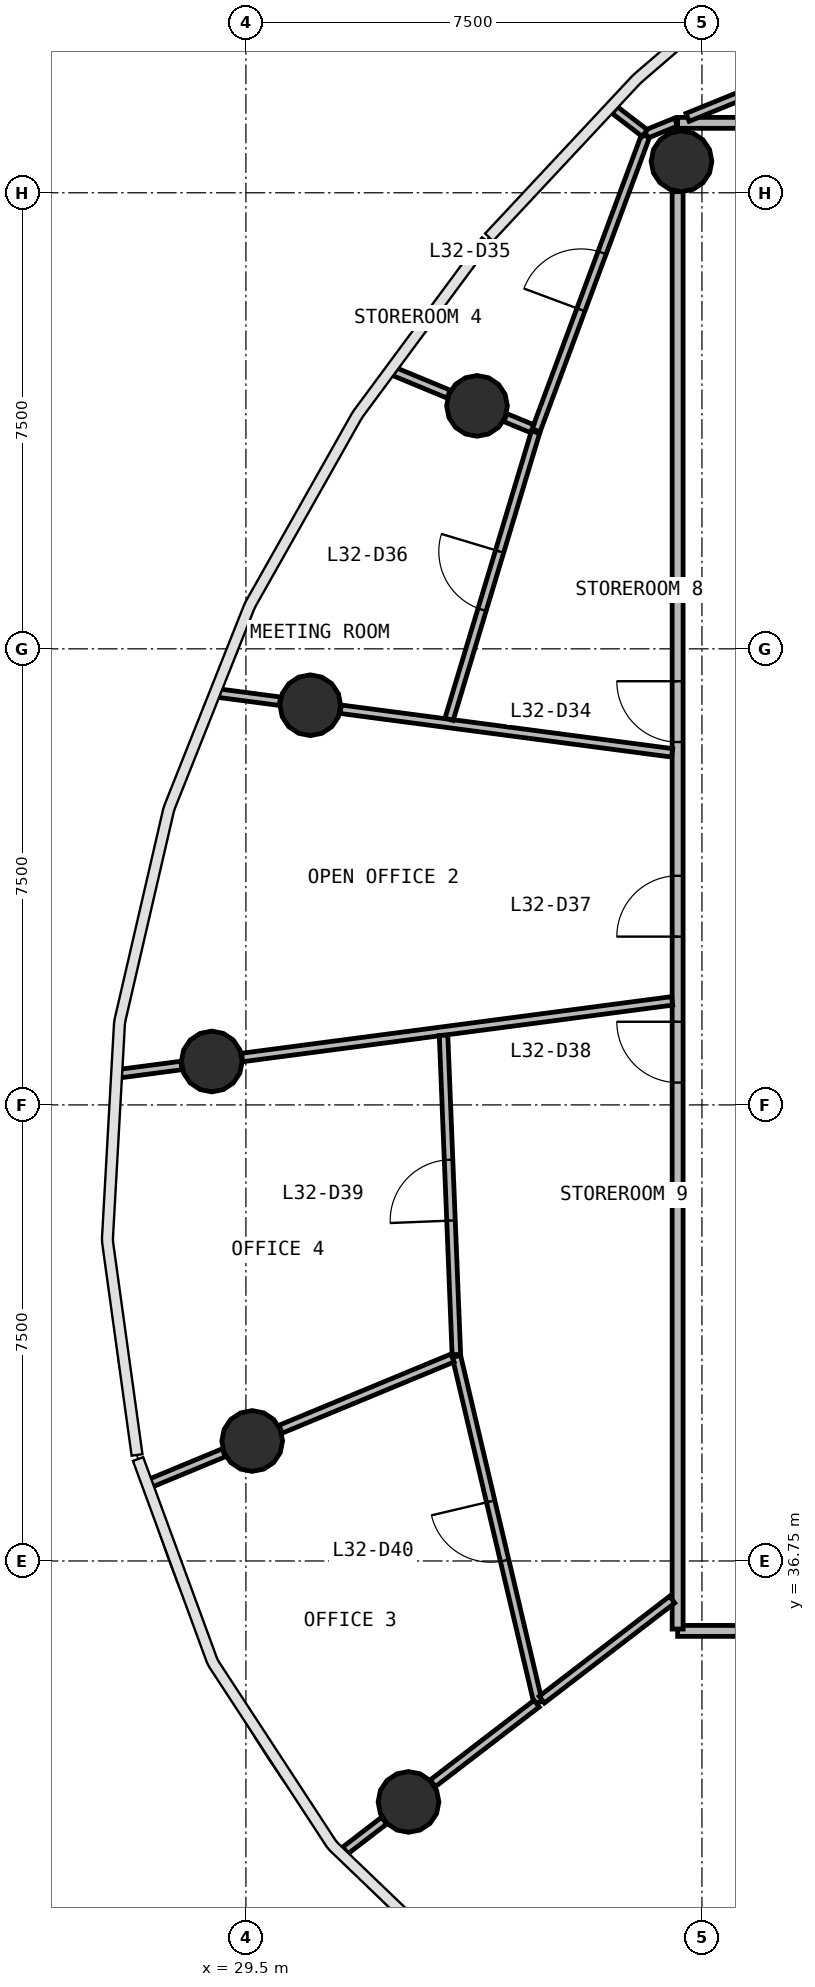
"""IFC4 building model, lengths in metres.
Left out: names, types, materials, properties, quantities, classifications, styles, units other than length and angle.
Written with IfcOpenShell. Run it as: python <this file> out.ifc"""

import sys

from ifc_helpers import new_model, si_unit, direction, frame, frame_2d, origin, origin_2d, place, context, subcontext, project, spatial, rectangle, circle, extrude, source, transform, mapped, element, fill, save


model = new_model("IFC4")
c1 = context("Model", 3, precision=1e-05, world=origin(), true_north=direction((0.0, 1.0)))
c2 = subcontext(c1, "Body", "Model", "MODEL_VIEW")
j1 = project(units=[si_unit("LENGTHUNIT", "METRE"), si_unit("PLANEANGLEUNIT", "RADIAN")], contexts=[c1])
p1 = place(None, origin())
s1 = spatial("IfcSite", under=j1, at=p1, CompositionType="ELEMENT")
p2 = place(p1, origin())
s2 = spatial("IfcBuilding", under=s1, at=p2, CompositionType="ELEMENT")
p3 = place(p2, frame((0.0, 0.0, 137.0)))
s3 = spatial("IfcBuildingStorey", under=s2, at=p3, CompositionType="ELEMENT", Elevation=137.0)
m1 = source(origin(), c2, "Body", "SweptSolid", [
    extrude(circle(Radius=0.5, at=origin_2d()), origin(), (0.0, 0.0, 1.0), 3.9),
])
for number, where, z_axis, x_axis in (
    (1, (36.664, 59.768, 0.0), (0.0, 0.0, 1.0), (1.0, 0.0, 0.0)),
    (2, (33.301, 55.746, 0.0), (0.0, 0.0, 1.0), (1.0, 0.0, 0.0)),
    (3, (30.559, 50.823, 0.0), (0.0, 0.0, 1.0), (1.0, 0.0, 0.0)),
    (4, (28.938, 44.964, 0.0), (0.0, 0.0, 1.0), (1.0, 0.0, 0.0)),
    (5, (29.603, 38.723, 0.0), (0.0, 0.0, 1.0), (1.0, 0.0, 0.0)),
    (6, (32.174, 32.787, 0.0), (0.0, 0.0, 1.0), (1.0, 0.0, 0.0)),
):
    element("IfcColumn", number, at=place(p3, frame(where, z_axis=z_axis, x_axis=x_axis)), inside=s3, PredefinedType="COLUMN", context=c2, shape_type="MappedRepresentation", body=[
        mapped(m1, transform((0.0, 0.0, 0.0), scale=1.0)),
    ])
p4 = place(p3, frame((67.4, 35.6, 0.0), z_axis=(0.0, 0.0, 1.0), x_axis=(-1.0, 0.0, 0.0)))
e7 = element("IfcWall", 7, at=p4, inside=s3, PredefinedType="PARTITIONING", context=c2, shape_type="SweptSolid", body=[
    extrude(rectangle(XDim=30.8, YDim=0.18, at=frame_2d((15.4, 0.0))), origin(), (0.0, 0.0, 1.0), 2.88),
])
p5 = place(p4, frame((20.95, 0.0, 0.0)))
e8 = element("IfcOpeningElement", 8, at=p5, cuts=e7, PredefinedType="OPENING", context=c2, shape_type="SweptSolid", body=[
    extrude(rectangle(XDim=1.0, YDim=2.1, at=frame_2d((0.5, 1.05))), frame((0.0, 0.1, 0.0), z_axis=(0.0, -1.0, 0.0), x_axis=(1.0, 0.0, 0.0)), (0.0, 0.0, 1.0), 0.2),
])
p6 = place(p4, frame((14.95, 0.0, 0.0)))
e9 = element("IfcOpeningElement", 9, at=p6, cuts=e7, PredefinedType="OPENING", context=c2, shape_type="SweptSolid", body=[
    extrude(rectangle(XDim=1.0, YDim=2.1, at=frame_2d((0.5, 1.05))), frame((0.0, 0.1, 0.0), z_axis=(0.0, -1.0, 0.0), x_axis=(1.0, 0.0, 0.0)), (0.0, 0.0, 1.0), 0.2),
])
p7 = place(p3, frame((36.6, 60.4, 0.0), z_axis=(0.0, 0.0, 1.0), x_axis=(1.0, 0.0, 0.0)))
e10 = element("IfcWall", 10, at=p7, inside=s3, PredefinedType="PARTITIONING", context=c2, shape_type="SweptSolid", body=[
    extrude(rectangle(XDim=30.8, YDim=0.18, at=frame_2d((15.4, 0.0))), origin(), (0.0, 0.0, 1.0), 2.88),
])
p8 = place(p7, frame((22.25, 0.0, 0.0)))
e11 = element("IfcOpeningElement", 11, at=p8, cuts=e10, PredefinedType="OPENING", context=c2, shape_type="SweptSolid", body=[
    extrude(rectangle(XDim=0.9, YDim=2.1, at=frame_2d((0.45, 1.05))), frame((0.0, 0.1, 0.0), z_axis=(0.0, -1.0, 0.0), x_axis=(1.0, 0.0, 0.0)), (0.0, 0.0, 1.0), 0.2),
])
p9 = place(p7, frame((19.65, 0.0, 0.0)))
e12 = element("IfcOpeningElement", 12, at=p9, cuts=e10, PredefinedType="OPENING", context=c2, shape_type="SweptSolid", body=[
    extrude(rectangle(XDim=0.9, YDim=2.1, at=frame_2d((0.45, 1.05))), frame((0.0, 0.1, 0.0), z_axis=(0.0, -1.0, 0.0), x_axis=(1.0, 0.0, 0.0)), (0.0, 0.0, 1.0), 0.2),
])
p10 = place(p7, frame((17.25, 0.0, 0.0)))
e13 = element("IfcOpeningElement", 13, at=p10, cuts=e10, PredefinedType="OPENING", context=c2, shape_type="SweptSolid", body=[
    extrude(rectangle(XDim=0.9, YDim=2.1, at=frame_2d((0.45, 1.05))), frame((0.0, 0.1, 0.0), z_axis=(0.0, -1.0, 0.0), x_axis=(1.0, 0.0, 0.0)), (0.0, 0.0, 1.0), 0.2),
])
p11 = place(p7, frame((14.95, 0.0, 0.0)))
e14 = element("IfcOpeningElement", 14, at=p11, cuts=e10, PredefinedType="OPENING", context=c2, shape_type="SweptSolid", body=[
    extrude(rectangle(XDim=1.0, YDim=2.1, at=frame_2d((0.5, 1.05))), frame((0.0, 0.1, 0.0), z_axis=(0.0, -1.0, 0.0), x_axis=(1.0, 0.0, 0.0)), (0.0, 0.0, 1.0), 0.2),
])
p12 = place(p3, frame((36.6, 35.63, 0.0), z_axis=(0.0, 0.0, 1.0), x_axis=(0.0, 1.0, 0.0)))
e15 = element("IfcWall", 15, at=p12, inside=s3, PredefinedType="PARTITIONING", context=c2, shape_type="SweptSolid", body=[
    extrude(rectangle(XDim=23.638, YDim=0.18, at=frame_2d((11.819, 0.0))), origin(), (0.0, 0.0, 1.0), 2.88),
])
p13 = place(p12, frame((14.587, 0.0, 0.0)))
e16 = element("IfcOpeningElement", 16, at=p13, cuts=e15, PredefinedType="OPENING", context=c2, shape_type="SweptSolid", body=[
    extrude(rectangle(XDim=1.0, YDim=2.1, at=frame_2d((0.5, 1.05))), frame((0.0, 0.1, 0.0), z_axis=(0.0, -1.0, 0.0), x_axis=(1.0, 0.0, 0.0)), (0.0, 0.0, 1.0), 0.2),
])
p14 = place(p12, frame((11.387, 0.0, 0.0)))
e17 = element("IfcOpeningElement", 17, at=p14, cuts=e15, PredefinedType="OPENING", context=c2, shape_type="SweptSolid", body=[
    extrude(rectangle(XDim=1.0, YDim=2.1, at=frame_2d((0.5, 1.05))), frame((0.0, 0.1, 0.0), z_axis=(0.0, -1.0, 0.0), x_axis=(1.0, 0.0, 0.0)), (0.0, 0.0, 1.0), 0.2),
])
p15 = place(p12, frame((8.988, 0.0, 0.0)))
e18 = element("IfcOpeningElement", 18, at=p15, cuts=e15, PredefinedType="OPENING", context=c2, shape_type="SweptSolid", body=[
    extrude(rectangle(XDim=1.0, YDim=2.1, at=frame_2d((0.5, 1.05))), frame((0.0, 0.1, 0.0), z_axis=(0.0, -1.0, 0.0), x_axis=(1.0, 0.0, 0.0)), (0.0, 0.0, 1.0), 0.2),
])
p16 = place(p3, frame((36.51, 45.961, 0.0), z_axis=(0.0, 0.0, 1.0), x_axis=(-0.991447420849, -0.130506749601, 0.0)))
e19 = element("IfcWall", 19, at=p16, inside=s3, PredefinedType="PARTITIONING", context=c2, shape_type="SweptSolid", body=[
    extrude(rectangle(XDim=7.133, YDim=0.14, at=frame_2d((3.566, 0.0))), origin(), (0.0, 0.0, 1.0), 2.88),
])
p17 = place(p3, frame((34.305, 34.422, 0.0), z_axis=(0.0, 0.0, 1.0), x_axis=(-0.229548849755, 0.973297141461, 0.0)))
e20 = element("IfcWall", 20, at=p17, inside=s3, PredefinedType="PARTITIONING", context=c2, shape_type="SweptSolid", body=[
    extrude(rectangle(XDim=5.849, YDim=0.14, at=frame_2d((2.924, 0.0))), origin(), (0.0, 0.0, 1.0), 2.88),
])
p18 = place(p17, frame((2.398, 0.0, 0.0)))
e21 = element("IfcOpeningElement", 21, at=p18, cuts=e20, PredefinedType="OPENING", context=c2, shape_type="SweptSolid", body=[
    extrude(rectangle(XDim=1.0, YDim=2.1, at=frame_2d((0.5, 1.05))), frame((0.0, 0.08, 0.0), z_axis=(0.0, -1.0, 0.0), x_axis=(1.0, 0.0, 0.0)), (0.0, 0.0, 1.0), 0.16),
])
p19 = place(p3, frame((36.51, 50.039, 0.0), z_axis=(0.0, 0.0, 1.0), x_axis=(-0.991447190362, 0.130508500581, 0.0)))
e22 = element("IfcWall", 22, at=p19, inside=s3, PredefinedType="PARTITIONING", context=c2, shape_type="SweptSolid", body=[
    extrude(rectangle(XDim=5.498, YDim=0.14, at=frame_2d((2.749, 0.0))), origin(), (0.0, 0.0, 1.0), 2.88),
])
p20 = place(p3, frame((36.573, 60.413, 0.0), z_axis=(0.0, 0.0, 1.0), x_axis=(-0.926456511484, -0.376401822961, 0.0)))
e23 = element("IfcWall", 23, at=p20, inside=s3, PredefinedType="PARTITIONING", context=c2, shape_type="SweptSolid", body=[
    extrude(rectangle(XDim=0.529, YDim=0.14, at=frame_2d((0.264, 0.0))), origin(), (0.0, 0.0, 1.0), 2.88),
])
p21 = place(p3, frame((36.763, 60.49, 0.0), z_axis=(0.0, 0.0, 1.0), x_axis=(0.926531191785, 0.376217956309, 0.0)))
e24 = element("IfcWall", 24, at=p21, inside=s3, PredefinedType="PARTITIONING", context=c2, shape_type="SweptSolid", body=[
    extrude(rectangle(XDim=4.652, YDim=0.14, at=frame_2d((2.326, 0.0))), origin(), (0.0, 0.0, 1.0), 2.88),
])
p22 = place(p21, frame((2.202, 0.0, 0.0)))
e25 = element("IfcOpeningElement", 25, at=p22, cuts=e24, PredefinedType="OPENING", context=c2, shape_type="SweptSolid", body=[
    extrude(rectangle(XDim=1.0, YDim=2.1, at=frame_2d((0.5, 1.05))), frame((0.0, 0.08, 0.0), z_axis=(0.0, -1.0, 0.0), x_axis=(1.0, 0.0, 0.0)), (0.0, 0.0, 1.0), 0.16),
])
p23 = place(p3, frame((32.961, 40.144, 0.0), z_axis=(0.0, 0.0, 1.0), x_axis=(-0.040140589207, 0.999194041765, 0.0)))
e26 = element("IfcWall", 26, at=p23, inside=s3, PredefinedType="PARTITIONING", context=c2, shape_type="SweptSolid", body=[
    extrude(rectangle(XDim=5.255, YDim=0.14, at=frame_2d((2.627, 0.0))), origin(), (0.0, 0.0, 1.0), 2.88),
])
p24 = place(p23, frame((2.205, 0.0, 0.0)))
e27 = element("IfcOpeningElement", 27, at=p24, cuts=e26, PredefinedType="OPENING", context=c2, shape_type="SweptSolid", body=[
    extrude(rectangle(XDim=1.0, YDim=2.1, at=frame_2d((0.5, 1.05))), frame((0.0, 0.08, 0.0), z_axis=(0.0, -1.0, 0.0), x_axis=(1.0, 0.0, 0.0)), (0.0, 0.0, 1.0), 0.16),
])
p25 = place(p3, frame((34.272, 55.343, 0.0), z_axis=(0.0, 0.0, 1.0), x_axis=(0.348465337837, 0.937321667479, 0.0)))
e28 = element("IfcWall", 28, at=p25, inside=s3, PredefinedType="PARTITIONING", context=c2, shape_type="SweptSolid", body=[
    extrude(rectangle(XDim=5.166, YDim=0.14, at=frame_2d((2.583, 0.0))), origin(), (0.0, 0.0, 1.0), 2.88),
])
p26 = place(p25, frame((2.116, 0.0, 0.0)))
e29 = element("IfcOpeningElement", 29, at=p26, cuts=e28, PredefinedType="OPENING", context=c2, shape_type="SweptSolid", body=[
    extrude(rectangle(XDim=1.0, YDim=2.1, at=frame_2d((0.5, 1.05))), frame((0.0, 0.08, 0.0), z_axis=(0.0, -1.0, 0.0), x_axis=(1.0, 0.0, 0.0)), (0.0, 0.0, 1.0), 0.16),
])
p27 = place(p3, frame((32.841, 50.593, 0.0), z_axis=(0.0, 0.0, 1.0), x_axis=(0.288451473593, 0.957494515588, 0.0)))
e30 = element("IfcWall", 30, at=p27, inside=s3, PredefinedType="PARTITIONING", context=c2, shape_type="SweptSolid", body=[
    extrude(rectangle(XDim=4.931, YDim=0.14, at=frame_2d((2.466, 0.0))), origin(), (0.0, 0.0, 1.0), 2.88),
])
p28 = place(p27, frame((1.881, 0.0, 0.0)))
e31 = element("IfcOpeningElement", 31, at=p28, cuts=e30, PredefinedType="OPENING", context=c2, shape_type="SweptSolid", body=[
    extrude(rectangle(XDim=1.0, YDim=2.1, at=frame_2d((0.5, 1.05))), frame((0.0, 0.08, 0.0), z_axis=(0.0, -1.0, 0.0), x_axis=(1.0, 0.0, 0.0)), (0.0, 0.0, 1.0), 0.16),
])
p29 = place(p3, frame((32.897, 40.087, 0.0), z_axis=(0.0, 0.0, 1.0), x_axis=(-0.923868053335, -0.382711144374, 0.0)))
e32 = element("IfcWall", 32, at=p29, inside=s3, PredefinedType="PARTITIONING", context=c2, shape_type="SweptSolid", body=[
    extrude(rectangle(XDim=3.06, YDim=0.14, at=frame_2d((1.53, 0.0))), origin(), (0.0, 0.0, 1.0), 2.88),
])
p30 = place(p3, frame((36.51, 36.114, 0.0), z_axis=(0.0, 0.0, 1.0), x_axis=(-0.793382381067, -0.608723580463, 0.0)))
e33 = element("IfcWall", 33, at=p30, inside=s3, PredefinedType="PARTITIONING", context=c2, shape_type="SweptSolid", body=[
    extrude(rectangle(XDim=2.702, YDim=0.14, at=frame_2d((1.351, 0.0))), origin(), (0.0, 0.0, 1.0), 2.88),
])
p31 = place(p3, frame((34.281, 34.404, 0.0), z_axis=(0.0, 0.0, 1.0), x_axis=(-0.793416377259, -0.608679268824, 0.0)))
e34 = element("IfcWall", 34, at=p31, inside=s3, PredefinedType="PARTITIONING", context=c2, shape_type="SweptSolid", body=[
    extrude(rectangle(XDim=2.152, YDim=0.14, at=frame_2d((1.076, 0.0))), origin(), (0.0, 0.0, 1.0), 2.88),
])
p32 = place(p3, frame((29.137, 38.53, 0.0), z_axis=(0.0, 0.0, 1.0), x_axis=(-0.923860720697, -0.382728844945, 0.0)))
e35 = element("IfcWall", 35, at=p32, inside=s3, PredefinedType="PARTITIONING", context=c2, shape_type="SweptSolid", body=[
    extrude(rectangle(XDim=1.296, YDim=0.14, at=frame_2d((0.648, 0.0))), origin(), (0.0, 0.0, 1.0), 2.88),
])
p33 = place(p3, frame((30.059, 50.889, 0.0), z_axis=(0.0, 0.0, 1.0), x_axis=(-0.99145510575, 0.13044835485, 0.0)))
e36 = element("IfcWall", 36, at=p33, inside=s3, PredefinedType="PARTITIONING", context=c2, shape_type="SweptSolid", body=[
    extrude(rectangle(XDim=1.026, YDim=0.14, at=frame_2d((0.513, 0.0))), origin(), (0.0, 0.0, 1.0), 2.88),
])
p34 = place(p3, frame((28.438, 44.898, 0.0), z_axis=(0.0, 0.0, 1.0), x_axis=(-0.991446142493, -0.130516460787, 0.0)))
e37 = element("IfcWall", 37, at=p34, inside=s3, PredefinedType="PARTITIONING", context=c2, shape_type="SweptSolid", body=[
    extrude(rectangle(XDim=1.02, YDim=0.14, at=frame_2d((0.51, 0.0))), origin(), (0.0, 0.0, 1.0), 2.88),
])
p35 = place(p3, frame((32.834, 55.939, 0.0), z_axis=(0.0, 0.0, 1.0), x_axis=(-0.923825225633, 0.382814514464, 0.0)))
e38 = element("IfcWall", 38, at=p35, inside=s3, PredefinedType="PARTITIONING", context=c2, shape_type="SweptSolid", body=[
    extrude(rectangle(XDim=0.963, YDim=0.14, at=frame_2d((0.481, 0.0))), origin(), (0.0, 0.0, 1.0), 2.88),
])
p36 = place(p3, frame((31.774, 32.48, 0.0), z_axis=(0.0, 0.0, 1.0), x_axis=(-0.79332296125, -0.6088010177, 0.0)))
e39 = element("IfcWall", 39, at=p36, inside=s3, PredefinedType="PARTITIONING", context=c2, shape_type="SweptSolid", body=[
    extrude(rectangle(XDim=0.804, YDim=0.14, at=frame_2d((0.402, 0.0))), origin(), (0.0, 0.0, 1.0), 2.88),
])
p37 = place(p3, frame((36.059, 60.232, 0.0), z_axis=(0.0, 0.0, 1.0), x_axis=(-0.79330932609, 0.608818785139, 0.0)))
e40 = element("IfcWall", 40, at=p37, inside=s3, PredefinedType="PARTITIONING", context=c2, shape_type="SweptSolid", body=[
    extrude(rectangle(XDim=0.622, YDim=0.14, at=frame_2d((0.311, 0.0))), origin(), (0.0, 0.0, 1.0), 2.88),
])
p38 = place(p3, frame((34.208, 55.37, 0.0), z_axis=(0.0, 0.0, 1.0), x_axis=(-0.923848198503, 0.382759070595, 0.0)))
e41 = element("IfcWall", 41, at=p38, inside=s3, PredefinedType="PARTITIONING", context=c2, shape_type="SweptSolid", body=[
    extrude(rectangle(XDim=0.477, YDim=0.14, at=frame_2d((0.238, 0.0))), origin(), (0.0, 0.0, 1.0), 2.88),
])
m2 = source(origin(), c2, "Body", "SweptSolid", [
    extrude(rectangle(XDim=1.0, YDim=2.1, at=frame_2d((0.5, 1.05))), frame((0.0, 0.025, 0.0), z_axis=(0.0, -1.0, 0.0), x_axis=(1.0, 0.0, 0.0)), (0.0, 0.0, 1.0), 0.05),
])
p39 = place(p13, origin())
e42 = element("IfcDoor", 42, at=p39, inside=s3, OperationType="SINGLE_SWING_RIGHT", PredefinedType="DOOR", context=c2, shape_type="MappedRepresentation", body=[
    mapped(m2, transform((0.0, 0.0, 0.0), scale=1.0)),
])
fill(e16, e42)
p40 = place(p26, origin())
e43 = element("IfcDoor", 43, at=p40, inside=s3, OperationType="SINGLE_SWING_LEFT", PredefinedType="DOOR", context=c2, shape_type="MappedRepresentation", body=[
    mapped(m2, transform((0.0, 0.0, 0.0), scale=1.0)),
])
fill(e29, e43)
p41 = place(p28, origin())
e44 = element("IfcDoor", 44, at=p41, inside=s3, OperationType="SINGLE_SWING_RIGHT", PredefinedType="DOOR", context=c2, shape_type="MappedRepresentation", body=[
    mapped(m2, transform((0.0, 0.0, 0.0), scale=1.0)),
])
fill(e31, e44)
p42 = place(p14, origin())
e45 = element("IfcDoor", 45, at=p42, inside=s3, OperationType="SINGLE_SWING_LEFT", PredefinedType="DOOR", context=c2, shape_type="MappedRepresentation", body=[
    mapped(m2, transform((0.0, 0.0, 0.0), scale=1.0)),
])
fill(e17, e45)
p43 = place(p15, origin())
e46 = element("IfcDoor", 46, at=p43, inside=s3, OperationType="SINGLE_SWING_RIGHT", PredefinedType="DOOR", context=c2, shape_type="MappedRepresentation", body=[
    mapped(m2, transform((0.0, 0.0, 0.0), scale=1.0)),
])
fill(e18, e46)
p44 = place(p24, origin())
e47 = element("IfcDoor", 47, at=p44, inside=s3, OperationType="SINGLE_SWING_LEFT", PredefinedType="DOOR", context=c2, shape_type="MappedRepresentation", body=[
    mapped(m2, transform((0.0, 0.0, 0.0), scale=1.0)),
])
fill(e27, e47)
p45 = place(p18, origin())
e48 = element("IfcDoor", 48, at=p45, inside=s3, OperationType="SINGLE_SWING_RIGHT", PredefinedType="DOOR", context=c2, shape_type="MappedRepresentation", body=[
    mapped(m2, transform((0.0, 0.0, 0.0), scale=1.0)),
])
fill(e21, e48)
save(model, sys.argv[1])
